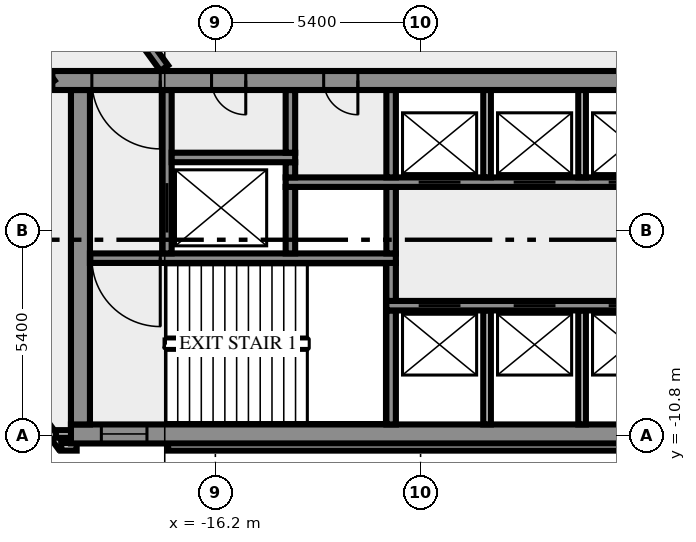
"""IFC4 building model, lengths in metres.
Left out: names, types, materials, properties, quantities, classifications, styles, units other than length and angle.
Written with IfcOpenShell. Run it as: python <this file> out.ifc"""

import sys

from ifc_helpers import new_model, si_unit, direction, frame, frame_2d, origin, place, context, subcontext, project, spatial, rectangle, extrude, element, fill, save


model = new_model("IFC4")
c1 = context("Model", 3, precision=1e-05, world=origin(), true_north=direction((0.0, 1.0)))
c2 = subcontext(c1, "Body", "Model", "MODEL_VIEW")
j1 = project(units=[si_unit("LENGTHUNIT", "METRE"), si_unit("PLANEANGLEUNIT", "RADIAN")], contexts=[c1])
p1 = place(None, origin())
s1 = spatial("IfcSite", under=j1, at=p1, CompositionType="ELEMENT")
p2 = place(p1, origin())
s2 = spatial("IfcBuilding", under=s1, at=p2, CompositionType="ELEMENT")
p3 = place(p2, frame((0.0, 0.0, 55.0)))
s3 = spatial("IfcBuildingStorey", under=s2, at=p3, CompositionType="ELEMENT", Elevation=55.0)
p4 = place(p3, frame((-21.833, -8.909, 0.0), z_axis=(0.0, 0.0, 1.0), x_axis=(0.587766567315, -0.809030569476, 0.0)))
e1 = element("IfcWall", 1, at=p4, inside=s3, PredefinedType="SOLIDWALL", context=c2, shape_type="SweptSolid", body=[
    extrude(rectangle(XDim=2.688, YDim=0.2, at=frame_2d((1.344, 0.0))), origin(), (0.0, 0.0, 1.0), 3.65),
])
p5 = place(p3, frame((-20.256, -11.088, 0.0), z_axis=(0.0, 0.0, 1.0), x_axis=(1.0, 0.0, 0.0)))
e2 = element("IfcWall", 2, at=p5, inside=s3, PredefinedType="SOLIDWALL", context=c2, shape_type="SweptSolid", body=[
    extrude(rectangle(XDim=0.406, YDim=0.2, at=frame_2d((0.203, 0.0))), origin(), (0.0, 0.0, 1.0), 3.65),
])
p6 = place(p3, frame((-17.444, -11.088, 0.0), z_axis=(0.0, 0.0, 1.0), x_axis=(1.0, 0.0, 0.0)))
e3 = element("IfcWall", 3, at=p6, inside=s3, PredefinedType="SOLIDWALL", context=c2, shape_type="SweptSolid", body=[
    extrude(rectangle(XDim=34.888, YDim=0.2, at=frame_2d((17.444, 0.0))), origin(), (0.0, 0.0, 1.0), 3.65),
])
p7 = place(p3, frame((-19.98, -10.75, 0.0), z_axis=(0.0, 0.0, 1.0), x_axis=(-1.0, 0.0, 0.0)))
e4 = element("IfcWall", 4, at=p7, inside=s3, PredefinedType="SOLIDWALL", context=c2, shape_type="SweptSolid", body=[
    extrude(rectangle(XDim=0.417, YDim=0.2, at=frame_2d((0.208, 0.0))), origin(), (0.0, 0.0, 1.0), 3.65),
])
p8 = place(p3, frame((-20.0, -10.75, 0.0), z_axis=(0.0, 0.0, 1.0), x_axis=(1.0, 0.0, 0.0)))
e5 = element("IfcWall", 5, at=p8, inside=s3, PredefinedType="SHEAR", context=c2, shape_type="SweptSolid", body=[
    extrude(rectangle(XDim=40.0, YDim=0.5, at=frame_2d((20.0, 0.0))), origin(), (0.0, 0.0, 1.0), 3.65),
])
p9 = place(p8, frame((0.8, 0.0, 1.0)))
e6 = element("IfcOpeningElement", 6, at=p9, cuts=e5, PredefinedType="OPENING", context=c2, shape_type="SweptSolid", body=[
    extrude(rectangle(XDim=1.2, YDim=1.2, at=frame_2d((0.6, 0.6))), frame((0.0, 0.26, 0.0), z_axis=(0.0, -1.0, 0.0), x_axis=(1.0, 0.0, 0.0)), (0.0, 0.0, 1.0), 0.52),
])
p10 = place(p8, frame((38.0, 0.0, 1.0)))
e7 = element("IfcOpeningElement", 7, at=p10, cuts=e5, PredefinedType="OPENING", context=c2, shape_type="SweptSolid", body=[
    extrude(rectangle(XDim=1.2, YDim=1.2, at=frame_2d((0.6, 0.6))), frame((0.0, 0.26, 0.0), z_axis=(0.0, -1.0, 0.0), x_axis=(1.0, 0.0, 0.0)), (0.0, 0.0, 1.0), 0.52),
])
p11 = place(p3, frame((-19.75, -10.5, 0.0), z_axis=(0.0, 0.0, 1.0), x_axis=(0.0, 1.0, 0.0)))
e8 = element("IfcWall", 8, at=p11, inside=s3, PredefinedType="SHEAR", context=c2, shape_type="SweptSolid", body=[
    extrude(rectangle(XDim=8.8, YDim=0.5, at=frame_2d((4.4, 0.0))), origin(), (0.0, 0.0, 1.0), 3.65),
])
p12 = place(p3, frame((-11.575, -10.5, 0.0), z_axis=(0.0, 0.0, 1.0), x_axis=(0.0, 1.0, 0.0)))
e9 = element("IfcWall", 9, at=p12, inside=s3, PredefinedType="SHEAR", context=c2, shape_type="SweptSolid", body=[
    extrude(rectangle(XDim=3.0, YDim=0.25, at=frame_2d((1.5, 0.0))), origin(), (0.0, 0.0, 1.0), 3.65),
])
for number, where, z_axis, x_axis in (
    (10, (-9.05, -10.5, 0.0), (0.0, 0.0, 1.0), (0.0, 1.0, 0.0)),
    (11, (-6.55, -10.5, 0.0), (0.0, 0.0, 1.0), (0.0, 1.0, 0.0)),
):
    element("IfcWall", number, at=place(p3, frame(where, z_axis=z_axis, x_axis=x_axis)), inside=s3, PredefinedType="SOLIDWALL", context=c2, shape_type="SweptSolid", body=[
        extrude(rectangle(XDim=3.0, YDim=0.2, at=frame_2d((1.5, 0.0))), origin(), (0.0, 0.0, 1.0), 3.65),
    ])
p13 = place(p3, frame((11.7, -7.375, 0.0), z_axis=(0.0, 0.0, 1.0), x_axis=(-1.0, 0.0, 0.0)))
e12 = element("IfcWall", 12, at=p13, inside=s3, PredefinedType="SHEAR", context=c2, shape_type="SweptSolid", body=[
    extrude(rectangle(XDim=23.4, YDim=0.25, at=frame_2d((11.7, 0.0))), origin(), (0.0, 0.0, 1.0), 3.65),
])
p14 = place(p13, frame((21.45, 0.0, 0.0)))
e13 = element("IfcOpeningElement", 13, at=p14, cuts=e12, PredefinedType="OPENING", context=c2, shape_type="SweptSolid", body=[
    extrude(rectangle(XDim=1.1, YDim=2.1, at=frame_2d((0.55, 1.05))), frame((0.0, 0.135, 0.0), z_axis=(0.0, -1.0, 0.0), x_axis=(1.0, 0.0, 0.0)), (0.0, 0.0, 1.0), 0.27),
])
p15 = place(p13, frame((18.95, 0.0, 0.0)))
e14 = element("IfcOpeningElement", 14, at=p15, cuts=e12, PredefinedType="OPENING", context=c2, shape_type="SweptSolid", body=[
    extrude(rectangle(XDim=1.1, YDim=2.1, at=frame_2d((0.55, 1.05))), frame((0.0, 0.135, 0.0), z_axis=(0.0, -1.0, 0.0), x_axis=(1.0, 0.0, 0.0)), (0.0, 0.0, 1.0), 0.27),
])
p16 = place(p13, frame((16.45, 0.0, 0.0)))
e15 = element("IfcOpeningElement", 15, at=p16, cuts=e12, PredefinedType="OPENING", context=c2, shape_type="SweptSolid", body=[
    extrude(rectangle(XDim=1.1, YDim=2.1, at=frame_2d((0.55, 1.05))), frame((0.0, 0.135, 0.0), z_axis=(0.0, -1.0, 0.0), x_axis=(1.0, 0.0, 0.0)), (0.0, 0.0, 1.0), 0.27),
])
p17 = place(p13, frame((14.5, 0.0, 0.0)))
e16 = element("IfcOpeningElement", 16, at=p17, cuts=e12, PredefinedType="OPENING", context=c2, shape_type="SweptSolid", body=[
    extrude(rectangle(XDim=0.9, YDim=2.1, at=frame_2d((0.45, 1.05))), frame((0.0, 0.135, 0.0), z_axis=(0.0, -1.0, 0.0), x_axis=(1.0, 0.0, 0.0)), (0.0, 0.0, 1.0), 0.27),
])
p18 = place(p13, frame((12.95, 0.0, 0.0)))
e17 = element("IfcOpeningElement", 17, at=p18, cuts=e12, PredefinedType="OPENING", context=c2, shape_type="SweptSolid", body=[
    extrude(rectangle(XDim=0.9, YDim=2.1, at=frame_2d((0.45, 1.05))), frame((0.0, 0.135, 0.0), z_axis=(0.0, -1.0, 0.0), x_axis=(1.0, 0.0, 0.0)), (0.0, 0.0, 1.0), 0.27),
])
p19 = place(p13, frame((11.475, 0.0, 0.0)))
e18 = element("IfcOpeningElement", 18, at=p19, cuts=e12, PredefinedType="OPENING", context=c2, shape_type="SweptSolid", body=[
    extrude(rectangle(XDim=0.9, YDim=2.1, at=frame_2d((0.45, 1.05))), frame((0.0, 0.135, 0.0), z_axis=(0.0, -1.0, 0.0), x_axis=(1.0, 0.0, 0.0)), (0.0, 0.0, 1.0), 0.27),
])
p20 = place(p13, frame((10.45, 0.0, 0.0)))
e19 = element("IfcOpeningElement", 19, at=p20, cuts=e12, PredefinedType="OPENING", context=c2, shape_type="SweptSolid", body=[
    extrude(rectangle(XDim=0.5, YDim=2.1, at=frame_2d((0.25, 1.05))), frame((0.0, 0.135, 0.0), z_axis=(0.0, -1.0, 0.0), x_axis=(1.0, 0.0, 0.0)), (0.0, 0.0, 1.0), 0.27),
])
p21 = place(p3, frame((-11.575, -7.25, 0.0), z_axis=(0.0, 0.0, 1.0), x_axis=(0.0, 1.0, 0.0)))
e20 = element("IfcWall", 20, at=p21, inside=s3, PredefinedType="SHEAR", context=c2, shape_type="SweptSolid", body=[
    extrude(rectangle(XDim=1.0, YDim=0.25, at=frame_2d((0.5, 0.0))), origin(), (0.0, 0.0, 1.0), 3.65),
])
p22 = place(p3, frame((-11.45, -6.125, 0.0), z_axis=(0.0, 0.0, 1.0), x_axis=(-1.0, 0.0, 0.0)))
e21 = element("IfcWall", 21, at=p22, inside=s3, PredefinedType="SHEAR", context=c2, shape_type="SweptSolid", body=[
    extrude(rectangle(XDim=8.05, YDim=0.25, at=frame_2d((4.025, 0.0))), origin(), (0.0, 0.0, 1.0), 3.65),
])
p23 = place(p22, frame((6.2, 0.0, 0.0)))
e22 = element("IfcOpeningElement", 22, at=p23, cuts=e21, PredefinedType="OPENING", context=c2, shape_type="SweptSolid", body=[
    extrude(rectangle(XDim=1.8, YDim=2.1, at=frame_2d((0.9, 1.05))), frame((0.0, 0.135, 0.0), z_axis=(0.0, -1.0, 0.0), x_axis=(1.0, 0.0, 0.0)), (0.0, 0.0, 1.0), 0.27),
])
p24 = place(p3, frame((-17.475, -6.0, 0.0), z_axis=(0.0, 0.0, 1.0), x_axis=(0.0, 1.0, 0.0)))
e23 = element("IfcWall", 23, at=p24, inside=s3, PredefinedType="SHEAR", context=c2, shape_type="SweptSolid", body=[
    extrude(rectangle(XDim=4.3, YDim=0.25, at=frame_2d((2.15, 0.0))), origin(), (0.0, 0.0, 1.0), 3.65),
])
p25 = place(p24, frame((0.55, 0.0, 0.0)))
e24 = element("IfcOpeningElement", 24, at=p25, cuts=e23, PredefinedType="OPENING", context=c2, shape_type="SweptSolid", body=[
    extrude(rectangle(XDim=1.3, YDim=2.1, at=frame_2d((0.65, 1.05))), frame((0.0, 0.135, 0.0), z_axis=(0.0, -1.0, 0.0), x_axis=(1.0, 0.0, 0.0)), (0.0, 0.0, 1.0), 0.27),
])
for number, where, z_axis, x_axis in (
    (25, (-14.225, -6.0, 0.0), (0.0, 0.0, 1.0), (0.0, 1.0, 0.0)),
    (26, (-11.575, -6.0, 0.0), (0.0, 0.0, 1.0), (0.0, 1.0, 0.0)),
):
    element("IfcWall", number, at=place(p3, frame(where, z_axis=z_axis, x_axis=x_axis)), inside=s3, PredefinedType="SHEAR", context=c2, shape_type="SweptSolid", body=[
        extrude(rectangle(XDim=1.75, YDim=0.25, at=frame_2d((0.875, 0.0))), origin(), (0.0, 0.0, 1.0), 3.65),
    ])
p26 = place(p3, frame((-14.35, -4.125, 0.0), z_axis=(0.0, 0.0, 1.0), x_axis=(1.0, 0.0, 0.0)))
e27 = element("IfcWall", 27, at=p26, inside=s3, PredefinedType="SHEAR", context=c2, shape_type="SweptSolid", body=[
    extrude(rectangle(XDim=12.7, YDim=0.25, at=frame_2d((6.35, 0.0))), origin(), (0.0, 0.0, 1.0), 3.65),
])
p27 = place(p26, frame((3.5, 0.0, 0.0)))
e28 = element("IfcOpeningElement", 28, at=p27, cuts=e27, PredefinedType="OPENING", context=c2, shape_type="SweptSolid", body=[
    extrude(rectangle(XDim=1.1, YDim=2.1, at=frame_2d((0.55, 1.05))), frame((0.0, 0.135, 0.0), z_axis=(0.0, -1.0, 0.0), x_axis=(1.0, 0.0, 0.0)), (0.0, 0.0, 1.0), 0.27),
])
p28 = place(p26, frame((6.0, 0.0, 0.0)))
e29 = element("IfcOpeningElement", 29, at=p28, cuts=e27, PredefinedType="OPENING", context=c2, shape_type="SweptSolid", body=[
    extrude(rectangle(XDim=1.1, YDim=2.1, at=frame_2d((0.55, 1.05))), frame((0.0, 0.135, 0.0), z_axis=(0.0, -1.0, 0.0), x_axis=(1.0, 0.0, 0.0)), (0.0, 0.0, 1.0), 0.27),
])
p29 = place(p26, frame((8.5, 0.0, 0.0)))
e30 = element("IfcOpeningElement", 30, at=p29, cuts=e27, PredefinedType="OPENING", context=c2, shape_type="SweptSolid", body=[
    extrude(rectangle(XDim=1.1, YDim=2.1, at=frame_2d((0.55, 1.05))), frame((0.0, 0.135, 0.0), z_axis=(0.0, -1.0, 0.0), x_axis=(1.0, 0.0, 0.0)), (0.0, 0.0, 1.0), 0.27),
])
p30 = place(p3, frame((-14.225, -4.0, 0.0), z_axis=(0.0, 0.0, 1.0), x_axis=(0.0, 1.0, 0.0)))
e31 = element("IfcWall", 31, at=p30, inside=s3, PredefinedType="SHEAR", context=c2, shape_type="SweptSolid", body=[
    extrude(rectangle(XDim=0.4, YDim=0.25, at=frame_2d((0.2, 0.0))), origin(), (0.0, 0.0, 1.0), 3.65),
])
p31 = place(p3, frame((-11.575, -4.0, 0.0), z_axis=(0.0, 0.0, 1.0), x_axis=(0.0, 1.0, 0.0)))
e32 = element("IfcWall", 32, at=p31, inside=s3, PredefinedType="SHEAR", context=c2, shape_type="SweptSolid", body=[
    extrude(rectangle(XDim=2.3, YDim=0.25, at=frame_2d((1.15, 0.0))), origin(), (0.0, 0.0, 1.0), 3.65),
])
for number, where, z_axis, x_axis in (
    (33, (-9.05, -4.0, 0.0), (0.0, 0.0, 1.0), (0.0, 1.0, 0.0)),
    (34, (-6.55, -4.0, 0.0), (0.0, 0.0, 1.0), (0.0, 1.0, 0.0)),
):
    element("IfcWall", number, at=place(p3, frame(where, z_axis=z_axis, x_axis=x_axis)), inside=s3, PredefinedType="SOLIDWALL", context=c2, shape_type="SweptSolid", body=[
        extrude(rectangle(XDim=2.3, YDim=0.2, at=frame_2d((1.15, 0.0))), origin(), (0.0, 0.0, 1.0), 3.65),
    ])
p32 = place(p3, frame((-17.35, -3.475, 0.0), z_axis=(0.0, 0.0, 1.0), x_axis=(1.0, 0.0, 0.0)))
e35 = element("IfcWall", 35, at=p32, inside=s3, PredefinedType="SHEAR", context=c2, shape_type="SweptSolid", body=[
    extrude(rectangle(XDim=3.25, YDim=0.25, at=frame_2d((1.625, 0.0))), origin(), (0.0, 0.0, 1.0), 3.65),
])
p33 = place(p3, frame((-14.225, -3.35, 0.0), z_axis=(0.0, 0.0, 1.0), x_axis=(0.0, 1.0, 0.0)))
e36 = element("IfcWall", 36, at=p33, inside=s3, PredefinedType="SHEAR", context=c2, shape_type="SweptSolid", body=[
    extrude(rectangle(XDim=1.65, YDim=0.25, at=frame_2d((0.825, 0.0))), origin(), (0.0, 0.0, 1.0), 3.65),
])
p34 = place(p3, frame((20.49, -1.45, 0.0), z_axis=(0.0, 0.0, 1.0), x_axis=(-1.0, 0.0, 0.0)))
e37 = element("IfcWall", 37, at=p34, inside=s3, PredefinedType="SHEAR", context=c2, shape_type="SweptSolid", body=[
    extrude(rectangle(XDim=40.98, YDim=0.5, at=frame_2d((20.49, 0.0))), origin(), (0.0, 0.0, 1.0), 3.65),
])
p35 = place(p34, frame((38.14, 0.0, 0.0)))
e38 = element("IfcOpeningElement", 38, at=p35, cuts=e37, PredefinedType="OPENING", context=c2, shape_type="SweptSolid", body=[
    extrude(rectangle(XDim=1.8, YDim=2.1, at=frame_2d((0.9, 1.05))), frame((0.0, 0.26, 0.0), z_axis=(0.0, -1.0, 0.0), x_axis=(1.0, 0.0, 0.0)), (0.0, 0.0, 1.0), 0.52),
])
p36 = place(p34, frame((35.89, 0.0, 0.0)))
e39 = element("IfcOpeningElement", 39, at=p36, cuts=e37, PredefinedType="OPENING", context=c2, shape_type="SweptSolid", body=[
    extrude(rectangle(XDim=0.9, YDim=2.1, at=frame_2d((0.45, 1.05))), frame((0.0, 0.26, 0.0), z_axis=(0.0, -1.0, 0.0), x_axis=(1.0, 0.0, 0.0)), (0.0, 0.0, 1.0), 0.52),
])
p37 = place(p34, frame((32.94, 0.0, 0.0)))
e40 = element("IfcOpeningElement", 40, at=p37, cuts=e37, PredefinedType="OPENING", context=c2, shape_type="SweptSolid", body=[
    extrude(rectangle(XDim=0.9, YDim=2.1, at=frame_2d((0.45, 1.05))), frame((0.0, 0.26, 0.0), z_axis=(0.0, -1.0, 0.0), x_axis=(1.0, 0.0, 0.0)), (0.0, 0.0, 1.0), 0.52),
])
p38 = place(p34, frame((19.59, 0.0, 0.0)))
e41 = element("IfcOpeningElement", 41, at=p38, cuts=e37, PredefinedType="OPENING", context=c2, shape_type="SweptSolid", body=[
    extrude(rectangle(XDim=2.0, YDim=2.1, at=frame_2d((1.0, 1.05))), frame((0.0, 0.26, 0.0), z_axis=(0.0, -1.0, 0.0), x_axis=(1.0, 0.0, 0.0)), (0.0, 0.0, 1.0), 0.52),
])
p39 = place(p34, frame((7.14, 0.0, 0.0)))
e42 = element("IfcOpeningElement", 42, at=p39, cuts=e37, PredefinedType="OPENING", context=c2, shape_type="SweptSolid", body=[
    extrude(rectangle(XDim=0.9, YDim=2.1, at=frame_2d((0.45, 1.05))), frame((0.0, 0.26, 0.0), z_axis=(0.0, -1.0, 0.0), x_axis=(1.0, 0.0, 0.0)), (0.0, 0.0, 1.0), 0.52),
])
p40 = place(p34, frame((5.028, 0.0, 0.0)))
e43 = element("IfcOpeningElement", 43, at=p40, cuts=e37, PredefinedType="OPENING", context=c2, shape_type="SweptSolid", body=[
    extrude(rectangle(XDim=0.8, YDim=2.1, at=frame_2d((0.4, 1.05))), frame((0.0, 0.26, 0.0), z_axis=(0.0, -1.0, 0.0), x_axis=(1.0, 0.0, 0.0)), (0.0, 0.0, 1.0), 0.52),
])
p41 = place(p34, frame((3.452, 0.0, 0.0)))
e44 = element("IfcOpeningElement", 44, at=p41, cuts=e37, PredefinedType="OPENING", context=c2, shape_type="SweptSolid", body=[
    extrude(rectangle(XDim=0.8, YDim=2.1, at=frame_2d((0.4, 1.05))), frame((0.0, 0.26, 0.0), z_axis=(0.0, -1.0, 0.0), x_axis=(1.0, 0.0, 0.0)), (0.0, 0.0, 1.0), 0.52),
])
p42 = place(p34, frame((1.04, 0.0, 0.0)))
e45 = element("IfcOpeningElement", 45, at=p42, cuts=e37, PredefinedType="OPENING", context=c2, shape_type="SweptSolid", body=[
    extrude(rectangle(XDim=1.8, YDim=2.1, at=frame_2d((0.9, 1.05))), frame((0.0, 0.26, 0.0), z_axis=(0.0, -1.0, 0.0), x_axis=(1.0, 0.0, 0.0)), (0.0, 0.0, 1.0), 0.52),
])
p43 = place(p3, frame((-20.531, -1.523, 0.0), z_axis=(0.0, 0.0, 1.0), x_axis=(-0.587784593204, 0.809017473231, 0.0)))
e46 = element("IfcWall", 46, at=p43, inside=s3, PredefinedType="SOLIDWALL", context=c2, shape_type="SweptSolid", body=[
    extrude(rectangle(XDim=44.67, YDim=0.25, at=frame_2d((22.335, 0.0))), origin(), (0.0, 0.0, 1.0), 3.65),
])
p44 = place(p43, frame((21.316, 0.0, 0.0)))
e47 = element("IfcOpeningElement", 47, at=p44, cuts=e46, PredefinedType="OPENING", context=c2, shape_type="SweptSolid", body=[
    extrude(rectangle(XDim=1.2, YDim=2.1, at=frame_2d((0.6, 1.05))), frame((0.0, 0.135, 0.0), z_axis=(0.0, -1.0, 0.0), x_axis=(1.0, 0.0, 0.0)), (0.0, 0.0, 1.0), 0.27),
])
p45 = place(p43, frame((17.015, 0.0, 0.0)))
e48 = element("IfcOpeningElement", 48, at=p45, cuts=e46, PredefinedType="OPENING", context=c2, shape_type="SweptSolid", body=[
    extrude(rectangle(XDim=0.9, YDim=2.1, at=frame_2d((0.45, 1.05))), frame((0.0, 0.135, 0.0), z_axis=(0.0, -1.0, 0.0), x_axis=(1.0, 0.0, 0.0)), (0.0, 0.0, 1.0), 0.27),
])
p46 = place(p43, frame((0.533, 0.0, 0.0)))
e49 = element("IfcOpeningElement", 49, at=p46, cuts=e46, PredefinedType="OPENING", context=c2, shape_type="SweptSolid", body=[
    extrude(rectangle(XDim=0.9, YDim=2.1, at=frame_2d((0.45, 1.05))), frame((0.0, 0.135, 0.0), z_axis=(0.0, -1.0, 0.0), x_axis=(1.0, 0.0, 0.0)), (0.0, 0.0, 1.0), 0.27),
])
p47 = place(p43, frame((18.616, 0.0, 0.0)))
e50 = element("IfcOpeningElement", 50, at=p47, cuts=e46, PredefinedType="OPENING", context=c2, shape_type="SweptSolid", body=[
    extrude(rectangle(XDim=0.9, YDim=2.1, at=frame_2d((0.45, 1.05))), frame((0.0, 0.135, 0.0), z_axis=(0.0, -1.0, 0.0), x_axis=(1.0, 0.0, 0.0)), (0.0, 0.0, 1.0), 0.27),
])
p48 = place(p43, frame((7.816, 0.0, 0.0)))
e51 = element("IfcOpeningElement", 51, at=p48, cuts=e46, PredefinedType="OPENING", context=c2, shape_type="SweptSolid", body=[
    extrude(rectangle(XDim=0.9, YDim=2.1, at=frame_2d((0.45, 1.05))), frame((0.0, 0.135, 0.0), z_axis=(0.0, -1.0, 0.0), x_axis=(1.0, 0.0, 0.0)), (0.0, 0.0, 1.0), 0.27),
])
p49 = place(p3, frame((-37.232, 25.972, 0.0), z_axis=(0.0, 0.0, 1.0), x_axis=(0.587786323093, -0.809016216391, 0.0)))
e52 = element("IfcWall", 52, at=p49, inside=s3, PredefinedType="SOLIDWALL", context=c2, shape_type="SweptSolid", body=[
    extrude(rectangle(XDim=33.493, YDim=0.25, at=frame_2d((16.747, 0.0))), origin(), (0.0, 0.0, 1.0), 3.65),
])
p50 = place(p49, frame((28.301, 0.0, 0.0)))
e53 = element("IfcOpeningElement", 53, at=p50, cuts=e52, PredefinedType="OPENING", context=c2, shape_type="SweptSolid", body=[
    extrude(rectangle(XDim=1.8, YDim=2.1, at=frame_2d((0.9, 1.05))), frame((0.0, 0.135, 0.0), z_axis=(0.0, -1.0, 0.0), x_axis=(1.0, 0.0, 0.0)), (0.0, 0.0, 1.0), 0.27),
])
p51 = place(p49, frame((4.235, 0.0, 0.0)))
e54 = element("IfcOpeningElement", 54, at=p51, cuts=e52, PredefinedType="OPENING", context=c2, shape_type="SweptSolid", body=[
    extrude(rectangle(XDim=1.8, YDim=2.1, at=frame_2d((0.9, 1.05))), frame((0.0, 0.135, 0.0), z_axis=(0.0, -1.0, 0.0), x_axis=(1.0, 0.0, 0.0)), (0.0, 0.0, 1.0), 0.27),
])
p52 = place(p49, frame((2.685, 0.0, 0.0)))
e55 = element("IfcOpeningElement", 55, at=p52, cuts=e52, PredefinedType="OPENING", context=c2, shape_type="SweptSolid", body=[
    extrude(rectangle(XDim=0.9, YDim=2.1, at=frame_2d((0.45, 1.05))), frame((0.0, 0.135, 0.0), z_axis=(0.0, -1.0, 0.0), x_axis=(1.0, 0.0, 0.0)), (0.0, 0.0, 1.0), 0.27),
])
p53 = place(p9, origin())
e56 = element("IfcWindow", 56, at=p53, inside=s3, PartitioningType="SINGLE_PANEL", PredefinedType="WINDOW", context=c2, shape_type="SweptSolid", body=[
    extrude(rectangle(XDim=1.2, YDim=1.2, at=frame_2d((0.6, 0.6))), frame((0.0, 0.03, 0.0), z_axis=(0.0, -1.0, 0.0), x_axis=(1.0, 0.0, 0.0)), (0.0, 0.0, 1.0), 0.06),
])
fill(e6, e56)
p54 = place(p14, origin())
e57 = element("IfcDoor", 57, at=p54, inside=s3, OperationType="DOUBLE_DOOR_SLIDING", PredefinedType="DOOR", context=c2, shape_type="SweptSolid", body=[
    extrude(rectangle(XDim=1.1, YDim=2.1, at=frame_2d((0.55, 1.05))), frame((0.0, 0.025, 0.0), z_axis=(0.0, -1.0, 0.0), x_axis=(1.0, 0.0, 0.0)), (0.0, 0.0, 1.0), 0.05),
])
fill(e13, e57)
p55 = place(p15, origin())
e58 = element("IfcDoor", 58, at=p55, inside=s3, OperationType="DOUBLE_DOOR_SLIDING", PredefinedType="DOOR", context=c2, shape_type="SweptSolid", body=[
    extrude(rectangle(XDim=1.1, YDim=2.1, at=frame_2d((0.55, 1.05))), frame((0.0, 0.025, 0.0), z_axis=(0.0, -1.0, 0.0), x_axis=(1.0, 0.0, 0.0)), (0.0, 0.0, 1.0), 0.05),
])
fill(e14, e58)
p56 = place(p16, origin())
e59 = element("IfcDoor", 59, at=p56, inside=s3, OperationType="DOUBLE_DOOR_SLIDING", PredefinedType="DOOR", context=c2, shape_type="SweptSolid", body=[
    extrude(rectangle(XDim=1.1, YDim=2.1, at=frame_2d((0.55, 1.05))), frame((0.0, 0.025, 0.0), z_axis=(0.0, -1.0, 0.0), x_axis=(1.0, 0.0, 0.0)), (0.0, 0.0, 1.0), 0.05),
])
fill(e15, e59)
p57 = place(p23, origin())
e60 = element("IfcDoor", 60, at=p57, inside=s3, OperationType="DOUBLE_DOOR_SINGLE_SWING", PredefinedType="DOOR", context=c2, shape_type="SweptSolid", body=[
    extrude(rectangle(XDim=1.8, YDim=2.1, at=frame_2d((0.9, 1.05))), frame((0.0, 0.025, 0.0), z_axis=(0.0, -1.0, 0.0), x_axis=(1.0, 0.0, 0.0)), (0.0, 0.0, 1.0), 0.05),
])
fill(e22, e60)
p58 = place(p25, origin())
e61 = element("IfcDoor", 61, at=p58, inside=s3, OperationType="DOUBLE_DOOR_SLIDING", PredefinedType="DOOR", context=c2, shape_type="SweptSolid", body=[
    extrude(rectangle(XDim=1.3, YDim=2.1, at=frame_2d((0.65, 1.05))), frame((0.0, 0.025, 0.0), z_axis=(0.0, -1.0, 0.0), x_axis=(1.0, 0.0, 0.0)), (0.0, 0.0, 1.0), 0.05),
])
fill(e24, e61)
p59 = place(p27, origin())
e62 = element("IfcDoor", 62, at=p59, inside=s3, OperationType="DOUBLE_DOOR_SLIDING", PredefinedType="DOOR", context=c2, shape_type="SweptSolid", body=[
    extrude(rectangle(XDim=1.1, YDim=2.1, at=frame_2d((0.55, 1.05))), frame((0.0, 0.025, 0.0), z_axis=(0.0, -1.0, 0.0), x_axis=(1.0, 0.0, 0.0)), (0.0, 0.0, 1.0), 0.05),
])
fill(e28, e62)
p60 = place(p28, origin())
e63 = element("IfcDoor", 63, at=p60, inside=s3, OperationType="DOUBLE_DOOR_SLIDING", PredefinedType="DOOR", context=c2, shape_type="SweptSolid", body=[
    extrude(rectangle(XDim=1.1, YDim=2.1, at=frame_2d((0.55, 1.05))), frame((0.0, 0.025, 0.0), z_axis=(0.0, -1.0, 0.0), x_axis=(1.0, 0.0, 0.0)), (0.0, 0.0, 1.0), 0.05),
])
fill(e29, e63)
p61 = place(p29, origin())
e64 = element("IfcDoor", 64, at=p61, inside=s3, OperationType="DOUBLE_DOOR_SLIDING", PredefinedType="DOOR", context=c2, shape_type="SweptSolid", body=[
    extrude(rectangle(XDim=1.1, YDim=2.1, at=frame_2d((0.55, 1.05))), frame((0.0, 0.025, 0.0), z_axis=(0.0, -1.0, 0.0), x_axis=(1.0, 0.0, 0.0)), (0.0, 0.0, 1.0), 0.05),
])
fill(e30, e64)
p62 = place(p35, origin())
e65 = element("IfcDoor", 65, at=p62, inside=s3, OperationType="DOUBLE_DOOR_SINGLE_SWING", PredefinedType="DOOR", context=c2, shape_type="SweptSolid", body=[
    extrude(rectangle(XDim=1.8, YDim=2.1, at=frame_2d((0.9, 1.05))), frame((0.0, 0.025, 0.0), z_axis=(0.0, -1.0, 0.0), x_axis=(1.0, 0.0, 0.0)), (0.0, 0.0, 1.0), 0.05),
])
fill(e38, e65)
p63 = place(p36, origin())
e66 = element("IfcDoor", 66, at=p63, inside=s3, OperationType="SINGLE_SWING_RIGHT", PredefinedType="DOOR", context=c2, shape_type="SweptSolid", body=[
    extrude(rectangle(XDim=0.9, YDim=2.1, at=frame_2d((0.45, 1.05))), frame((0.0, 0.025, 0.0), z_axis=(0.0, -1.0, 0.0), x_axis=(1.0, 0.0, 0.0)), (0.0, 0.0, 1.0), 0.05),
])
fill(e39, e66)
p64 = place(p37, origin())
e67 = element("IfcDoor", 67, at=p64, inside=s3, OperationType="SINGLE_SWING_RIGHT", PredefinedType="DOOR", context=c2, shape_type="SweptSolid", body=[
    extrude(rectangle(XDim=0.9, YDim=2.1, at=frame_2d((0.45, 1.05))), frame((0.0, 0.025, 0.0), z_axis=(0.0, -1.0, 0.0), x_axis=(1.0, 0.0, 0.0)), (0.0, 0.0, 1.0), 0.05),
])
fill(e40, e67)
save(model, sys.argv[1])
